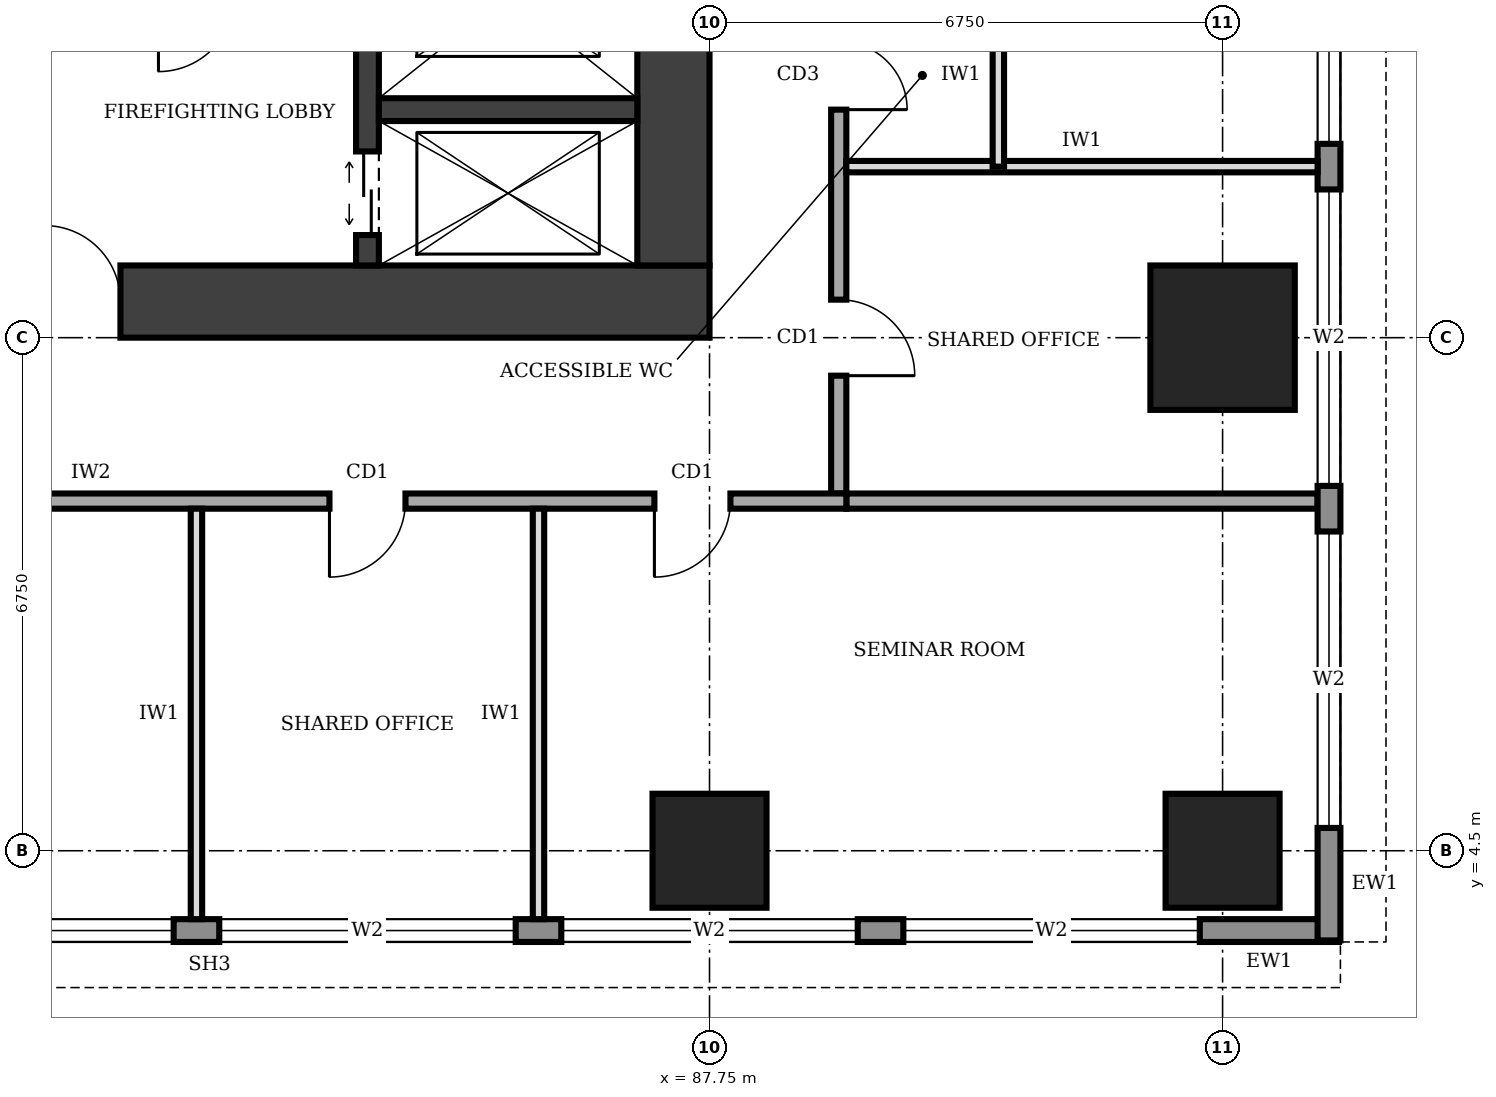
"""IFC4 building model, lengths in metres.
Left out: names, types, materials, properties, quantities, classifications, styles, units other than length and angle.
Written with IfcOpenShell. Run it as: python <this file> out.ifc"""

import sys

from ifc_helpers import new_model, si_unit, direction, frame, frame_2d, origin, origin_2d, place, context, subcontext, project, spatial, rectangle, extrude, element, fill, save


model = new_model("IFC4")
c1 = context("Model", 3, precision=1e-05, world=origin(), true_north=direction((0.0, 1.0)))
c2 = subcontext(c1, "Body", "Model", "MODEL_VIEW")
j1 = project(units=[si_unit("LENGTHUNIT", "METRE"), si_unit("PLANEANGLEUNIT", "RADIAN")], contexts=[c1])
p1 = place(None, origin())
s1 = spatial("IfcSite", under=j1, at=p1, CompositionType="ELEMENT")
p2 = place(p1, origin())
s2 = spatial("IfcBuilding", under=s1, at=p2, CompositionType="ELEMENT")
p3 = place(p2, frame((0.0, 0.0, 137.0)))
s3 = spatial("IfcBuildingStorey", under=s2, at=p3, CompositionType="ELEMENT", Elevation=137.0)
p4 = place(p3, frame((74.25, 11.725, 0.0), z_axis=(0.0, 0.0, 1.0), x_axis=(1.0, 0.0, 0.0)))
e1 = element("IfcWall", 1, at=p4, inside=s3, PredefinedType="SHEAR", context=c2, shape_type="SweptSolid", body=[
    extrude(rectangle(XDim=13.5, YDim=0.95, at=frame_2d((6.75, 0.0))), origin(), (0.0, 0.0, 1.0), 4.0),
])
p5 = place(p4, frame((4.75, 0.0, 0.0)))
e2 = element("IfcOpeningElement", 2, at=p5, cuts=e1, PredefinedType="OPENING", context=c2, shape_type="SweptSolid", body=[
    extrude(rectangle(XDim=1.0, YDim=2.1, at=frame_2d((0.5, 1.05))), frame((0.0, 0.485, 0.0), z_axis=(0.0, -1.0, 0.0), x_axis=(1.0, 0.0, 0.0)), (0.0, 0.0, 1.0), 0.97),
])
p6 = place(p3, frame((87.275, 12.2, 0.0), z_axis=(0.0, 0.0, 1.0), x_axis=(0.0, 1.0, 0.0)))
e3 = element("IfcWall", 3, at=p6, inside=s3, PredefinedType="SHEAR", context=c2, shape_type="SweptSolid", body=[
    extrude(rectangle(XDim=16.1, YDim=0.95, at=frame_2d((8.05, 0.0))), origin(), (0.0, 0.0, 1.0), 4.0),
])
p7 = place(p3, frame((83.25, 12.2, 0.0), z_axis=(0.0, 0.0, 1.0), x_axis=(0.0, 1.0, 0.0)))
e4 = element("IfcWall", 4, at=p7, inside=s3, PredefinedType="SHEAR", context=c2, shape_type="SweptSolid", body=[
    extrude(rectangle(XDim=16.1, YDim=0.3, at=frame_2d((8.05, 0.0))), origin(), (0.0, 0.0, 1.0), 4.0),
])
p8 = place(p7, frame((14.7, 0.0, 0.0)))
e5 = element("IfcOpeningElement", 5, at=p8, cuts=e4, PredefinedType="OPENING", context=c2, shape_type="SweptSolid", body=[
    extrude(rectangle(XDim=1.0, YDim=2.1, at=frame_2d((0.5, 1.05))), frame((0.0, 0.16, 0.0), z_axis=(0.0, -1.0, 0.0), x_axis=(1.0, 0.0, 0.0)), (0.0, 0.0, 1.0), 0.32),
])
p9 = place(p7, frame((0.4, 0.0, 0.0)))
e6 = element("IfcOpeningElement", 6, at=p9, cuts=e4, PredefinedType="OPENING", context=c2, shape_type="SweptSolid", body=[
    extrude(rectangle(XDim=1.1, YDim=2.1, at=frame_2d((0.55, 1.05))), frame((0.0, 0.16, 0.0), z_axis=(0.0, -1.0, 0.0), x_axis=(1.0, 0.0, 0.0)), (0.0, 0.0, 1.0), 0.32),
])
p10 = place(p7, frame((3.75, 0.0, 0.0)))
e7 = element("IfcOpeningElement", 7, at=p10, cuts=e4, PredefinedType="OPENING", context=c2, shape_type="SweptSolid", body=[
    extrude(rectangle(XDim=1.1, YDim=2.1, at=frame_2d((0.55, 1.05))), frame((0.0, 0.16, 0.0), z_axis=(0.0, -1.0, 0.0), x_axis=(1.0, 0.0, 0.0)), (0.0, 0.0, 1.0), 0.32),
])
p11 = place(p7, frame((6.0, 0.0, 0.0)))
e8 = element("IfcOpeningElement", 8, at=p11, cuts=e4, PredefinedType="OPENING", context=c2, shape_type="SweptSolid", body=[
    extrude(rectangle(XDim=1.1, YDim=2.1, at=frame_2d((0.55, 1.05))), frame((0.0, 0.16, 0.0), z_axis=(0.0, -1.0, 0.0), x_axis=(1.0, 0.0, 0.0)), (0.0, 0.0, 1.0), 0.32),
])
p12 = place(p3, frame((83.4, 14.25, 0.0), z_axis=(0.0, 0.0, 1.0), x_axis=(1.0, 0.0, 0.0)))
e9 = element("IfcWall", 9, at=p12, inside=s3, PredefinedType="SHEAR", context=c2, shape_type="SweptSolid", body=[
    extrude(rectangle(XDim=3.4, YDim=0.3, at=frame_2d((1.7, 0.0))), origin(), (0.0, 0.0, 1.0), 4.0),
])
for number, where, z_axis, x_axis in (
    (10, (87.75, 4.5, 0.0), (0.0, 0.0, 1.0), (1.0, 0.0, 0.0)),
    (11, (94.5, 4.5, 0.0), (0.0, 0.0, 1.0), (1.0, 0.0, 0.0)),
):
    element("IfcColumn", number, at=place(p3, frame(where, z_axis=z_axis, x_axis=x_axis)), inside=s3, PredefinedType="COLUMN", context=c2, shape_type="SweptSolid", body=[
        extrude(rectangle(XDim=1.5, YDim=1.5, at=origin_2d()), origin(), (0.0, 0.0, 1.0), 4.0),
    ])
p13 = place(p3, frame((94.5, 11.25, 0.0), z_axis=(0.0, 0.0, 1.0), x_axis=(1.0, 0.0, 0.0)))
e12 = element("IfcColumn", 12, at=p13, inside=s3, PredefinedType="COLUMN", context=c2, shape_type="SweptSolid", body=[
    extrude(rectangle(XDim=1.9, YDim=1.9, at=origin_2d()), origin(), (0.0, 0.0, 1.0), 4.0),
])
p14 = place(p3, frame((66.32, 3.45, 0.0), z_axis=(0.0, 0.0, 1.0), x_axis=(1.0, 0.0, 0.0)))
e13 = element("IfcWall", 13, at=p14, inside=s3, PredefinedType="STANDARD", context=c2, shape_type="SweptSolid", body=[
    extrude(rectangle(XDim=29.71, YDim=0.3, at=frame_2d((14.855, 0.0))), origin(), (0.0, 0.0, 1.0), 3.75),
])
p15 = place(p14, frame((1.48, 0.0, 0.6)))
e14 = element("IfcOpeningElement", 14, at=p15, cuts=e13, PredefinedType="OPENING", context=c2, shape_type="SweptSolid", body=[
    extrude(rectangle(XDim=3.9, YDim=2.6, at=frame_2d((1.95, 1.3))), frame((0.0, 0.16, 0.0), z_axis=(0.0, -1.0, 0.0), x_axis=(1.0, 0.0, 0.0)), (0.0, 0.0, 1.0), 0.32),
])
p16 = place(p14, frame((5.98, 0.0, 0.6)))
e15 = element("IfcOpeningElement", 15, at=p16, cuts=e13, PredefinedType="OPENING", context=c2, shape_type="SweptSolid", body=[
    extrude(rectangle(XDim=3.9, YDim=2.6, at=frame_2d((1.95, 1.3))), frame((0.0, 0.16, 0.0), z_axis=(0.0, -1.0, 0.0), x_axis=(1.0, 0.0, 0.0)), (0.0, 0.0, 1.0), 0.32),
])
p17 = place(p14, frame((10.48, 0.0, 0.6)))
e16 = element("IfcOpeningElement", 16, at=p17, cuts=e13, PredefinedType="OPENING", context=c2, shape_type="SweptSolid", body=[
    extrude(rectangle(XDim=3.9, YDim=2.6, at=frame_2d((1.95, 1.3))), frame((0.0, 0.16, 0.0), z_axis=(0.0, -1.0, 0.0), x_axis=(1.0, 0.0, 0.0)), (0.0, 0.0, 1.0), 0.32),
])
p18 = place(p14, frame((14.98, 0.0, 0.6)))
e17 = element("IfcOpeningElement", 17, at=p18, cuts=e13, PredefinedType="OPENING", context=c2, shape_type="SweptSolid", body=[
    extrude(rectangle(XDim=3.9, YDim=2.6, at=frame_2d((1.95, 1.3))), frame((0.0, 0.16, 0.0), z_axis=(0.0, -1.0, 0.0), x_axis=(1.0, 0.0, 0.0)), (0.0, 0.0, 1.0), 0.32),
])
p19 = place(p14, frame((19.48, 0.0, 0.6)))
e18 = element("IfcOpeningElement", 18, at=p19, cuts=e13, PredefinedType="OPENING", context=c2, shape_type="SweptSolid", body=[
    extrude(rectangle(XDim=3.9, YDim=2.6, at=frame_2d((1.95, 1.3))), frame((0.0, 0.16, 0.0), z_axis=(0.0, -1.0, 0.0), x_axis=(1.0, 0.0, 0.0)), (0.0, 0.0, 1.0), 0.32),
])
p20 = place(p14, frame((23.98, 0.0, 0.6)))
e19 = element("IfcOpeningElement", 19, at=p20, cuts=e13, PredefinedType="OPENING", context=c2, shape_type="SweptSolid", body=[
    extrude(rectangle(XDim=3.9, YDim=2.6, at=frame_2d((1.95, 1.3))), frame((0.0, 0.16, 0.0), z_axis=(0.0, -1.0, 0.0), x_axis=(1.0, 0.0, 0.0)), (0.0, 0.0, 1.0), 0.32),
])
p21 = place(p3, frame((95.9, 3.32, 0.0), z_axis=(0.0, 0.0, 1.0), x_axis=(0.0, 1.0, 0.0)))
e20 = element("IfcWall", 20, at=p21, inside=s3, PredefinedType="STANDARD", context=c2, shape_type="SweptSolid", body=[
    extrude(rectangle(XDim=33.86, YDim=0.3, at=frame_2d((16.93, 0.0))), origin(), (0.0, 0.0, 1.0), 3.75),
])
p22 = place(p21, frame((1.48, 0.0, 0.6)))
e21 = element("IfcOpeningElement", 21, at=p22, cuts=e20, PredefinedType="OPENING", context=c2, shape_type="SweptSolid", body=[
    extrude(rectangle(XDim=3.9, YDim=2.6, at=frame_2d((1.95, 1.3))), frame((0.0, 0.16, 0.0), z_axis=(0.0, -1.0, 0.0), x_axis=(1.0, 0.0, 0.0)), (0.0, 0.0, 1.0), 0.32),
])
p23 = place(p21, frame((5.98, 0.0, 0.6)))
e22 = element("IfcOpeningElement", 22, at=p23, cuts=e20, PredefinedType="OPENING", context=c2, shape_type="SweptSolid", body=[
    extrude(rectangle(XDim=3.9, YDim=2.6, at=frame_2d((1.95, 1.3))), frame((0.0, 0.16, 0.0), z_axis=(0.0, -1.0, 0.0), x_axis=(1.0, 0.0, 0.0)), (0.0, 0.0, 1.0), 0.32),
])
p24 = place(p21, frame((10.48, 0.0, 0.6)))
e23 = element("IfcOpeningElement", 23, at=p24, cuts=e20, PredefinedType="OPENING", context=c2, shape_type="SweptSolid", body=[
    extrude(rectangle(XDim=3.9, YDim=2.6, at=frame_2d((1.95, 1.3))), frame((0.0, 0.16, 0.0), z_axis=(0.0, -1.0, 0.0), x_axis=(1.0, 0.0, 0.0)), (0.0, 0.0, 1.0), 0.32),
])
p25 = place(p21, frame((14.98, 0.0, 0.6)))
e24 = element("IfcOpeningElement", 24, at=p25, cuts=e20, PredefinedType="OPENING", context=c2, shape_type="SweptSolid", body=[
    extrude(rectangle(XDim=3.9, YDim=2.6, at=frame_2d((1.95, 1.3))), frame((0.0, 0.16, 0.0), z_axis=(0.0, -1.0, 0.0), x_axis=(1.0, 0.0, 0.0)), (0.0, 0.0, 1.0), 0.32),
])
p26 = place(p21, frame((19.48, 0.0, 0.6)))
e25 = element("IfcOpeningElement", 25, at=p26, cuts=e20, PredefinedType="OPENING", context=c2, shape_type="SweptSolid", body=[
    extrude(rectangle(XDim=3.9, YDim=2.6, at=frame_2d((1.95, 1.3))), frame((0.0, 0.16, 0.0), z_axis=(0.0, -1.0, 0.0), x_axis=(1.0, 0.0, 0.0)), (0.0, 0.0, 1.0), 0.32),
])
p27 = place(p21, frame((23.98, 0.0, 0.6)))
e26 = element("IfcOpeningElement", 26, at=p27, cuts=e20, PredefinedType="OPENING", context=c2, shape_type="SweptSolid", body=[
    extrude(rectangle(XDim=3.9, YDim=2.6, at=frame_2d((1.95, 1.3))), frame((0.0, 0.16, 0.0), z_axis=(0.0, -1.0, 0.0), x_axis=(1.0, 0.0, 0.0)), (0.0, 0.0, 1.0), 0.32),
])
p28 = place(p21, frame((28.48, 0.0, 0.6)))
e27 = element("IfcOpeningElement", 27, at=p28, cuts=e20, PredefinedType="OPENING", context=c2, shape_type="SweptSolid", body=[
    extrude(rectangle(XDim=3.9, YDim=2.6, at=frame_2d((1.95, 1.3))), frame((0.0, 0.16, 0.0), z_axis=(0.0, -1.0, 0.0), x_axis=(1.0, 0.0, 0.0)), (0.0, 0.0, 1.0), 0.32),
])
p29 = place(p3, frame((71.15, 9.1, 0.0), z_axis=(0.0, 0.0, 1.0), x_axis=(1.0, 0.0, 0.0)))
e28 = element("IfcWall", 28, at=p29, inside=s3, PredefinedType="SOLIDWALL", context=c2, shape_type="SweptSolid", body=[
    extrude(rectangle(XDim=18.4, YDim=0.2, at=frame_2d((9.2, 0.0))), origin(), (0.0, 0.0, 1.0), 3.75),
])
p30 = place(p29, frame((4.325, 0.0, 0.0)))
e29 = element("IfcOpeningElement", 29, at=p30, cuts=e28, PredefinedType="OPENING", context=c2, shape_type="SweptSolid", body=[
    extrude(rectangle(XDim=1.0, YDim=2.1, at=frame_2d((0.5, 1.05))), frame((0.0, 0.11, 0.0), z_axis=(0.0, -1.0, 0.0), x_axis=(1.0, 0.0, 0.0)), (0.0, 0.0, 1.0), 0.22),
])
p31 = place(p29, frame((11.6, 0.0, 0.0)))
e30 = element("IfcOpeningElement", 30, at=p31, cuts=e28, PredefinedType="OPENING", context=c2, shape_type="SweptSolid", body=[
    extrude(rectangle(XDim=1.0, YDim=2.1, at=frame_2d((0.5, 1.05))), frame((0.0, 0.11, 0.0), z_axis=(0.0, -1.0, 0.0), x_axis=(1.0, 0.0, 0.0)), (0.0, 0.0, 1.0), 0.22),
])
p32 = place(p29, frame((15.875, 0.0, 0.0)))
e31 = element("IfcOpeningElement", 31, at=p32, cuts=e28, PredefinedType="OPENING", context=c2, shape_type="SweptSolid", body=[
    extrude(rectangle(XDim=1.0, YDim=2.1, at=frame_2d((0.5, 1.05))), frame((0.0, 0.11, 0.0), z_axis=(0.0, -1.0, 0.0), x_axis=(1.0, 0.0, 0.0)), (0.0, 0.0, 1.0), 0.22),
])
p33 = place(p3, frame((89.45, 9.2, 0.0), z_axis=(0.0, 0.0, 1.0), x_axis=(0.0, 1.0, 0.0)))
e32 = element("IfcWall", 32, at=p33, inside=s3, PredefinedType="SOLIDWALL", context=c2, shape_type="SweptSolid", body=[
    extrude(rectangle(XDim=23.8, YDim=0.2, at=frame_2d((11.9, 0.0))), origin(), (0.0, 0.0, 1.0), 3.75),
])
p34 = place(p33, frame((1.55, 0.0, 0.0)))
e33 = element("IfcOpeningElement", 33, at=p34, cuts=e32, PredefinedType="OPENING", context=c2, shape_type="SweptSolid", body=[
    extrude(rectangle(XDim=1.0, YDim=2.1, at=frame_2d((0.5, 1.05))), frame((0.0, 0.11, 0.0), z_axis=(0.0, -1.0, 0.0), x_axis=(1.0, 0.0, 0.0)), (0.0, 0.0, 1.0), 0.22),
])
p35 = place(p33, frame((5.05, 0.0, 0.0)))
e34 = element("IfcOpeningElement", 34, at=p35, cuts=e32, PredefinedType="OPENING", context=c2, shape_type="SweptSolid", body=[
    extrude(rectangle(XDim=0.9, YDim=2.1, at=frame_2d((0.45, 1.05))), frame((0.0, 0.11, 0.0), z_axis=(0.0, -1.0, 0.0), x_axis=(1.0, 0.0, 0.0)), (0.0, 0.0, 1.0), 0.22),
])
p36 = place(p33, frame((8.25, 0.0, 0.0)))
e35 = element("IfcOpeningElement", 35, at=p36, cuts=e32, PredefinedType="OPENING", context=c2, shape_type="SweptSolid", body=[
    extrude(rectangle(XDim=0.9, YDim=2.1, at=frame_2d((0.45, 1.05))), frame((0.0, 0.11, 0.0), z_axis=(0.0, -1.0, 0.0), x_axis=(1.0, 0.0, 0.0)), (0.0, 0.0, 1.0), 0.22),
])
p37 = place(p33, frame((13.8, 0.0, 0.0)))
e36 = element("IfcOpeningElement", 36, at=p37, cuts=e32, PredefinedType="OPENING", context=c2, shape_type="SweptSolid", body=[
    extrude(rectangle(XDim=0.9, YDim=2.1, at=frame_2d((0.45, 1.05))), frame((0.0, 0.11, 0.0), z_axis=(0.0, -1.0, 0.0), x_axis=(1.0, 0.0, 0.0)), (0.0, 0.0, 1.0), 0.22),
])
p38 = place(p33, frame((16.3, 0.0, 0.0)))
e37 = element("IfcOpeningElement", 37, at=p38, cuts=e32, PredefinedType="OPENING", context=c2, shape_type="SweptSolid", body=[
    extrude(rectangle(XDim=1.0, YDim=2.1, at=frame_2d((0.5, 1.05))), frame((0.0, 0.11, 0.0), z_axis=(0.0, -1.0, 0.0), x_axis=(1.0, 0.0, 0.0)), (0.0, 0.0, 1.0), 0.22),
])
p39 = place(p33, frame((11.2, 0.0, 0.0)))
e38 = element("IfcOpeningElement", 38, at=p39, cuts=e32, PredefinedType="OPENING", context=c2, shape_type="SweptSolid", body=[
    extrude(rectangle(XDim=1.0, YDim=2.1, at=frame_2d((0.5, 1.05))), frame((0.0, 0.11, 0.0), z_axis=(0.0, -1.0, 0.0), x_axis=(1.0, 0.0, 0.0)), (0.0, 0.0, 1.0), 0.22),
])
p40 = place(p33, frame((20.3, 0.0, 0.0)))
e39 = element("IfcOpeningElement", 39, at=p40, cuts=e32, PredefinedType="OPENING", context=c2, shape_type="SweptSolid", body=[
    extrude(rectangle(XDim=1.0, YDim=2.1, at=frame_2d((0.5, 1.05))), frame((0.0, 0.11, 0.0), z_axis=(0.0, -1.0, 0.0), x_axis=(1.0, 0.0, 0.0)), (0.0, 0.0, 1.0), 0.22),
])
p41 = place(p3, frame((89.55, 9.1, 0.0), z_axis=(0.0, 0.0, 1.0), x_axis=(1.0, 0.0, 0.0)))
e40 = element("IfcWall", 40, at=p41, inside=s3, PredefinedType="SOLIDWALL", context=c2, shape_type="SweptSolid", body=[
    extrude(rectangle(XDim=6.2, YDim=0.2, at=frame_2d((3.1, 0.0))), origin(), (0.0, 0.0, 1.0), 3.75),
])
for number, where, z_axis, x_axis in (
    (41, (81.0, 3.6, 0.0), (0.0, 0.0, 1.0), (0.0, 1.0, 0.0)),
    (42, (85.5, 3.6, 0.0), (0.0, 0.0, 1.0), (0.0, 1.0, 0.0)),
):
    element("IfcWall", number, at=place(p3, frame(where, z_axis=z_axis, x_axis=x_axis)), inside=s3, PredefinedType="PARTITIONING", context=c2, shape_type="SweptSolid", body=[
        extrude(rectangle(XDim=5.4, YDim=0.15, at=frame_2d((2.7, 0.0))), origin(), (0.0, 0.0, 1.0), 3.75),
    ])
p42 = place(p3, frame((89.55, 13.5, 0.0), z_axis=(0.0, 0.0, 1.0), x_axis=(1.0, 0.0, 0.0)))
e43 = element("IfcWall", 43, at=p42, inside=s3, PredefinedType="PARTITIONING", context=c2, shape_type="SweptSolid", body=[
    extrude(rectangle(XDim=6.2, YDim=0.15, at=frame_2d((3.1, 0.0))), origin(), (0.0, 0.0, 1.0), 3.75),
])
p43 = place(p3, frame((91.55, 13.5, 0.0), z_axis=(0.0, 0.0, 1.0), x_axis=(0.0, 1.0, 0.0)))
e44 = element("IfcWall", 44, at=p43, inside=s3, PredefinedType="PARTITIONING", context=c2, shape_type="SweptSolid", body=[
    extrude(rectangle(XDim=2.4, YDim=0.15, at=frame_2d((1.2, 0.0))), origin(), (0.0, 0.0, 1.0), 3.75),
])
p44 = place(p17, origin())
e45 = element("IfcWindow", 45, at=p44, inside=s3, PartitioningType="SINGLE_PANEL", PredefinedType="WINDOW", context=c2, shape_type="SweptSolid", body=[
    extrude(rectangle(XDim=3.9, YDim=2.6, at=frame_2d((1.95, 1.3))), frame((0.0, 0.03, 0.0), z_axis=(0.0, -1.0, 0.0), x_axis=(1.0, 0.0, 0.0)), (0.0, 0.0, 1.0), 0.06),
])
fill(e16, e45)
p45 = place(p18, origin())
e46 = element("IfcWindow", 46, at=p45, inside=s3, PartitioningType="SINGLE_PANEL", PredefinedType="WINDOW", context=c2, shape_type="SweptSolid", body=[
    extrude(rectangle(XDim=3.9, YDim=2.6, at=frame_2d((1.95, 1.3))), frame((0.0, 0.03, 0.0), z_axis=(0.0, -1.0, 0.0), x_axis=(1.0, 0.0, 0.0)), (0.0, 0.0, 1.0), 0.06),
])
fill(e17, e46)
p46 = place(p19, origin())
e47 = element("IfcWindow", 47, at=p46, inside=s3, PartitioningType="SINGLE_PANEL", PredefinedType="WINDOW", context=c2, shape_type="SweptSolid", body=[
    extrude(rectangle(XDim=3.9, YDim=2.6, at=frame_2d((1.95, 1.3))), frame((0.0, 0.03, 0.0), z_axis=(0.0, -1.0, 0.0), x_axis=(1.0, 0.0, 0.0)), (0.0, 0.0, 1.0), 0.06),
])
fill(e18, e47)
p47 = place(p20, origin())
e48 = element("IfcWindow", 48, at=p47, inside=s3, PartitioningType="SINGLE_PANEL", PredefinedType="WINDOW", context=c2, shape_type="SweptSolid", body=[
    extrude(rectangle(XDim=3.9, YDim=2.6, at=frame_2d((1.95, 1.3))), frame((0.0, 0.03, 0.0), z_axis=(0.0, -1.0, 0.0), x_axis=(1.0, 0.0, 0.0)), (0.0, 0.0, 1.0), 0.06),
])
fill(e19, e48)
p48 = place(p22, origin())
e49 = element("IfcWindow", 49, at=p48, inside=s3, PartitioningType="SINGLE_PANEL", PredefinedType="WINDOW", context=c2, shape_type="SweptSolid", body=[
    extrude(rectangle(XDim=3.9, YDim=2.6, at=frame_2d((1.95, 1.3))), frame((0.0, 0.03, 0.0), z_axis=(0.0, -1.0, 0.0), x_axis=(1.0, 0.0, 0.0)), (0.0, 0.0, 1.0), 0.06),
])
fill(e21, e49)
p49 = place(p23, origin())
e50 = element("IfcWindow", 50, at=p49, inside=s3, PartitioningType="SINGLE_PANEL", PredefinedType="WINDOW", context=c2, shape_type="SweptSolid", body=[
    extrude(rectangle(XDim=3.9, YDim=2.6, at=frame_2d((1.95, 1.3))), frame((0.0, 0.03, 0.0), z_axis=(0.0, -1.0, 0.0), x_axis=(1.0, 0.0, 0.0)), (0.0, 0.0, 1.0), 0.06),
])
fill(e22, e50)
p50 = place(p24, origin())
e51 = element("IfcWindow", 51, at=p50, inside=s3, PartitioningType="SINGLE_PANEL", PredefinedType="WINDOW", context=c2, shape_type="SweptSolid", body=[
    extrude(rectangle(XDim=3.9, YDim=2.6, at=frame_2d((1.95, 1.3))), frame((0.0, 0.03, 0.0), z_axis=(0.0, -1.0, 0.0), x_axis=(1.0, 0.0, 0.0)), (0.0, 0.0, 1.0), 0.06),
])
fill(e23, e51)
p51 = place(p5, origin())
e52 = element("IfcDoor", 52, at=p51, inside=s3, OperationType="SINGLE_SWING_LEFT", PredefinedType="DOOR", context=c2, shape_type="SweptSolid", body=[
    extrude(rectangle(XDim=1.0, YDim=2.1, at=frame_2d((0.5, 1.05))), frame((0.0, 0.025, 0.0), z_axis=(0.0, -1.0, 0.0), x_axis=(1.0, 0.0, 0.0)), (0.0, 0.0, 1.0), 0.05),
])
fill(e2, e52)
p52 = place(p9, origin())
e53 = element("IfcDoor", 53, at=p52, inside=s3, OperationType="DOUBLE_DOOR_SLIDING", PredefinedType="DOOR", context=c2, shape_type="SweptSolid", body=[
    extrude(rectangle(XDim=1.1, YDim=2.1, at=frame_2d((0.55, 1.05))), frame((0.0, 0.025, 0.0), z_axis=(0.0, -1.0, 0.0), x_axis=(1.0, 0.0, 0.0)), (0.0, 0.0, 1.0), 0.05),
])
fill(e6, e53)
p53 = place(p31, frame((1.0, 0.0, 0.0), z_axis=(0.0, 0.0, 1.0), x_axis=(-1.0, 0.0, 0.0)))
e54 = element("IfcDoor", 54, at=p53, inside=s3, OperationType="SINGLE_SWING_RIGHT", PredefinedType="DOOR", context=c2, shape_type="SweptSolid", body=[
    extrude(rectangle(XDim=1.0, YDim=2.1, at=frame_2d((0.5, 1.05))), frame((0.0, 0.025, 0.0), z_axis=(0.0, -1.0, 0.0), x_axis=(1.0, 0.0, 0.0)), (0.0, 0.0, 1.0), 0.05),
])
fill(e30, e54)
p54 = place(p32, frame((1.0, 0.0, 0.0), z_axis=(0.0, 0.0, 1.0), x_axis=(-1.0, 0.0, 0.0)))
e55 = element("IfcDoor", 55, at=p54, inside=s3, OperationType="SINGLE_SWING_RIGHT", PredefinedType="DOOR", context=c2, shape_type="SweptSolid", body=[
    extrude(rectangle(XDim=1.0, YDim=2.1, at=frame_2d((0.5, 1.05))), frame((0.0, 0.025, 0.0), z_axis=(0.0, -1.0, 0.0), x_axis=(1.0, 0.0, 0.0)), (0.0, 0.0, 1.0), 0.05),
])
fill(e31, e55)
p55 = place(p34, frame((1.0, 0.0, 0.0), z_axis=(0.0, 0.0, 1.0), x_axis=(-1.0, 0.0, 0.0)))
e56 = element("IfcDoor", 56, at=p55, inside=s3, OperationType="SINGLE_SWING_RIGHT", PredefinedType="DOOR", context=c2, shape_type="SweptSolid", body=[
    extrude(rectangle(XDim=1.0, YDim=2.1, at=frame_2d((0.5, 1.05))), frame((0.0, 0.025, 0.0), z_axis=(0.0, -1.0, 0.0), x_axis=(1.0, 0.0, 0.0)), (0.0, 0.0, 1.0), 0.05),
])
fill(e33, e56)
p56 = place(p35, frame((0.9, 0.0, 0.0), z_axis=(0.0, 0.0, 1.0), x_axis=(-1.0, 0.0, 0.0)))
e57 = element("IfcDoor", 57, at=p56, inside=s3, OperationType="SINGLE_SWING_RIGHT", PredefinedType="DOOR", context=c2, shape_type="SweptSolid", body=[
    extrude(rectangle(XDim=0.9, YDim=2.1, at=frame_2d((0.45, 1.05))), frame((0.0, 0.025, 0.0), z_axis=(0.0, -1.0, 0.0), x_axis=(1.0, 0.0, 0.0)), (0.0, 0.0, 1.0), 0.05),
])
fill(e34, e57)
save(model, sys.argv[1])
